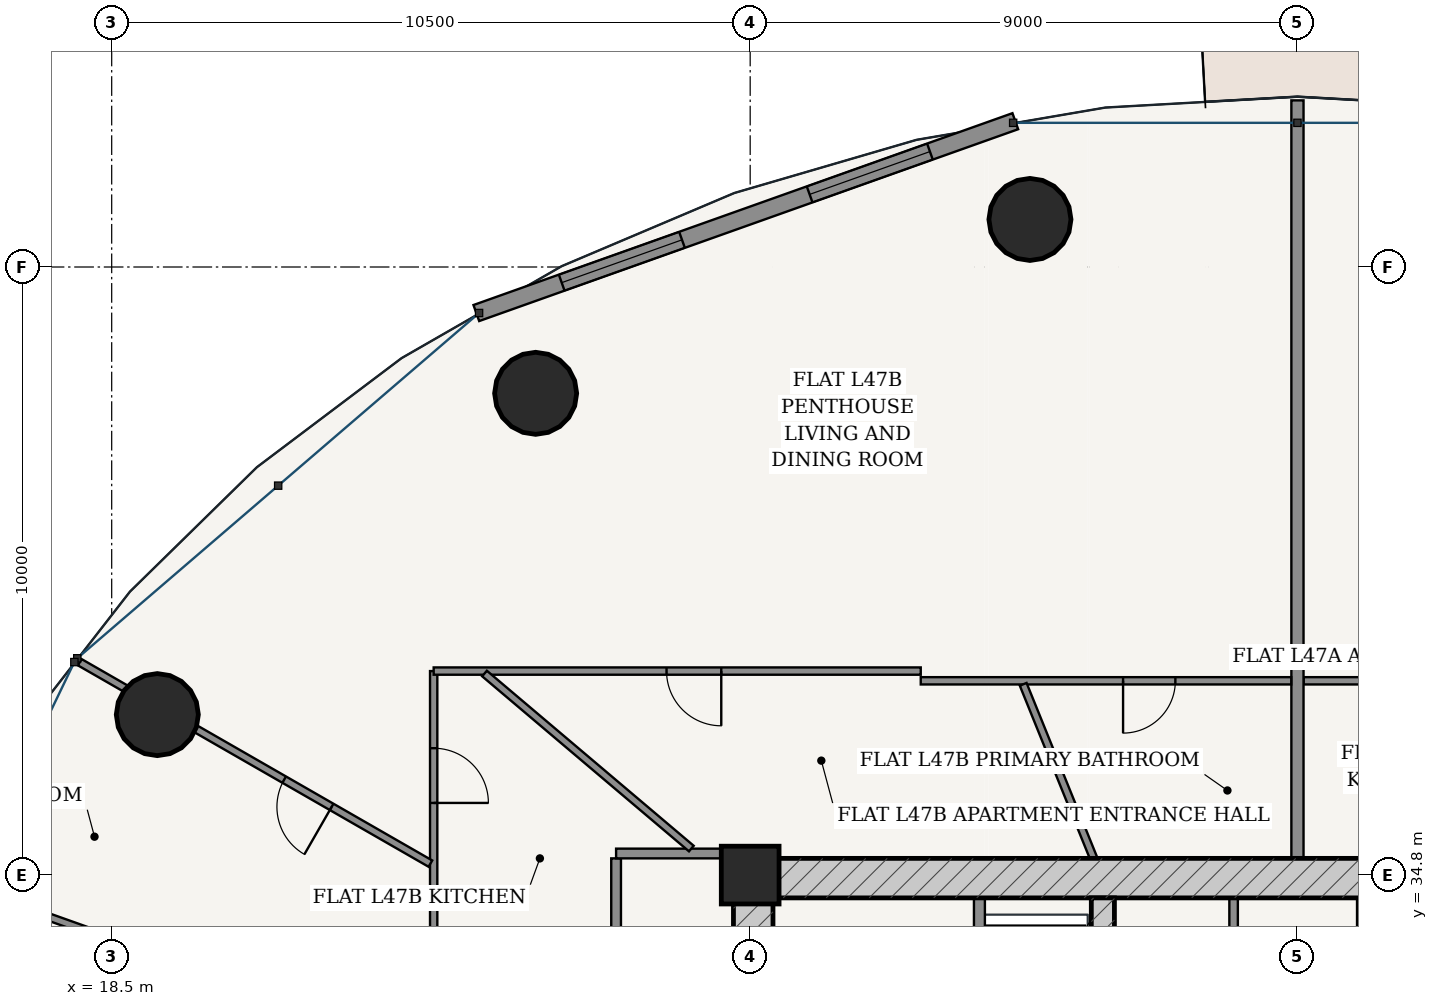
"""IFC4 building model, lengths in metres.
Left out: names, types, materials, properties, quantities, classifications, styles, units other than length and angle.
Written with IfcOpenShell. Run it as: python <this file> out.ifc"""

import sys

from ifc_helpers import new_model, si_unit, direction, frame, frame_2d, origin, origin_2d, place, context, subcontext, project, spatial, rectangle, hollow_circle, extrude, source, transform, mapped, element, fill, save


model = new_model("IFC4")
c1 = context("Model", 3, precision=1e-05, world=origin(), true_north=direction((-0.2419218956, 0.970295726276)))
c2 = subcontext(c1, "Body", "Model", "MODEL_VIEW")
j1 = project(units=[si_unit("LENGTHUNIT", "METRE"), si_unit("PLANEANGLEUNIT", "RADIAN")], contexts=[c1])
p1 = place(None, origin())
s1 = spatial("IfcSite", under=j1, at=p1, CompositionType="ELEMENT")
p2 = place(p1, origin())
s2 = spatial("IfcBuilding", under=s1, at=p2, CompositionType="ELEMENT")
p3 = place(p2, frame((0.0, 0.0, 178.6)))
s3 = spatial("IfcBuildingStorey", under=s2, at=p3, CompositionType="ELEMENT", Elevation=178.6)
p4 = place(p3, frame((29.0, 34.8, 0.0), z_axis=(0.0, 0.0, 1.0), x_axis=(1.0, 0.0, 0.0)))
e1 = element("IfcColumn", 1, at=p4, inside=s3, PredefinedType="COLUMN", context=c2, shape_type="SweptSolid", body=[
    extrude(rectangle(XDim=0.95, YDim=0.95, at=origin_2d()), origin(), (0.0, 0.0, 1.0), 3.6),
])
p5 = place(p3, frame((28.725, 34.75, 0.0), z_axis=(0.0, 0.0, 1.0), x_axis=(1.0, 0.0, 0.0)))
e2 = element("IfcWall", 2, at=p5, inside=s3, PredefinedType="SHEAR", context=c2, shape_type="SweptSolid", body=[
    extrude(rectangle(XDim=18.55, YDim=0.65, at=frame_2d((9.275, 0.0))), origin(), (0.0, 0.0, 1.0), 3.33),
])
p6 = place(p3, frame((29.05, 19.175, 0.0), z_axis=(0.0, 0.0, 1.0), x_axis=(0.0, 1.0, 0.0)))
e3 = element("IfcWall", 3, at=p6, inside=s3, PredefinedType="SHEAR", context=c2, shape_type="SweptSolid", body=[
    extrude(rectangle(XDim=15.25, YDim=0.65, at=frame_2d((7.625, 0.0))), origin(), (0.0, 0.0, 1.0), 3.33),
])
p7 = place(p6, frame((9.875, 0.0, 0.0)))
e4 = element("IfcOpeningElement", 4, at=p7, cuts=e3, PredefinedType="OPENING", context=c2, shape_type="SweptSolid", body=[
    extrude(rectangle(XDim=1.5, YDim=2.2, at=frame_2d((0.75, 1.1))), frame((0.0, 0.335, 0.0), z_axis=(0.0, -1.0, 0.0), x_axis=(1.0, 0.0, 0.0)), (0.0, 0.0, 1.0), 0.67),
])
p8 = place(p3, frame((34.8, 19.175, 0.0), z_axis=(0.0, 0.0, 1.0), x_axis=(0.0, 1.0, 0.0)))
e5 = element("IfcWall", 5, at=p8, inside=s3, PredefinedType="SHEAR", context=c2, shape_type="SweptSolid", body=[
    extrude(rectangle(XDim=15.25, YDim=0.38, at=frame_2d((7.625, 0.0))), origin(), (0.0, 0.0, 1.0), 3.33),
])
p9 = place(p8, frame((7.8, 0.0, 0.0)))
e6 = element("IfcOpeningElement", 6, at=p9, cuts=e5, PredefinedType="OPENING", context=c2, shape_type="SweptSolid", body=[
    extrude(rectangle(XDim=1.05, YDim=2.15, at=frame_2d((0.525, 1.075))), frame((0.0, 0.2, 0.0), z_axis=(0.0, -1.0, 0.0), x_axis=(1.0, 0.0, 0.0)), (0.0, 0.0, 1.0), 0.4),
])
for number, where, z_axis, x_axis in (
    (7, (33.601, 45.582, 0.0), (0.0, 0.0, 1.0), (1.0, 0.0, 0.0)),
    (8, (25.472, 42.723, 0.0), (0.0, 0.0, 1.0), (1.0, 0.0, 0.0)),
    (9, (19.25, 37.439, 0.0), (0.0, 0.0, 1.0), (1.0, 0.0, 0.0)),
):
    element("IfcColumn", number, at=place(p3, frame(where, z_axis=z_axis, x_axis=x_axis)), inside=s3, PredefinedType="COLUMN", context=c2, shape_type="SweptSolid", body=[
        extrude(hollow_circle(Radius=0.675, WallThickness=0.042, at=origin_2d()), origin(), (0.0, 0.0, 1.0), 3.6),
    ])
p10 = place(p3, frame((33.36, 47.198, 0.0), z_axis=(0.0, 0.0, 1.0), x_axis=(-0.942095406405, -0.335344964522, 0.0)))
e10 = element("IfcWall", 10, at=p10, inside=s3, PredefinedType="SOLIDWALL", context=c2, shape_type="SweptSolid", body=[
    extrude(rectangle(XDim=9.408, YDim=0.28, at=frame_2d((4.704, 0.0))), origin(), (0.0, 0.0, 1.0), 3.33),
])
p11 = place(p10, frame((1.49, 0.0, 0.85)))
e11 = element("IfcOpeningElement", 11, at=p11, cuts=e10, PredefinedType="OPENING", context=c2, shape_type="SweptSolid", body=[
    extrude(rectangle(XDim=2.1, YDim=1.95, at=frame_2d((1.05, 0.975))), frame((0.0, 0.15, 0.0), z_axis=(0.0, -1.0, 0.0), x_axis=(1.0, 0.0, 0.0)), (0.0, 0.0, 1.0), 0.3),
])
p12 = place(p10, frame((5.818, 0.0, 0.85)))
e12 = element("IfcOpeningElement", 12, at=p12, cuts=e10, PredefinedType="OPENING", context=c2, shape_type="SweptSolid", body=[
    extrude(rectangle(XDim=2.1, YDim=1.95, at=frame_2d((1.05, 0.975))), frame((0.0, 0.15, 0.0), z_axis=(0.0, -1.0, 0.0), x_axis=(1.0, 0.0, 0.0)), (0.0, 0.0, 1.0), 0.3),
])
p13 = place(p3, frame((32.77, 28.52, 0.0), z_axis=(0.0, 0.0, 1.0), x_axis=(0.0, 1.0, 0.0)))
e13 = element("IfcWall", 13, at=p13, inside=s3, PredefinedType="PARTITIONING", context=c2, shape_type="SweptSolid", body=[
    extrude(rectangle(XDim=5.905, YDim=0.18, at=frame_2d((2.953, 0.0))), origin(), (0.0, 0.0, 1.0), 3.33),
])
p14 = place(p13, frame((3.655, 0.0, 0.0)))
e14 = element("IfcOpeningElement", 14, at=p14, cuts=e13, PredefinedType="OPENING", context=c2, shape_type="SweptSolid", body=[
    extrude(rectangle(XDim=1.15, YDim=2.2, at=frame_2d((0.575, 1.1))), frame((0.0, 0.1, 0.0), z_axis=(0.0, -1.0, 0.0), x_axis=(1.0, 0.0, 0.0)), (0.0, 0.0, 1.0), 0.2),
])
p15 = place(p13, frame((0.73, 0.0, 0.0)))
e15 = element("IfcOpeningElement", 15, at=p15, cuts=e13, PredefinedType="OPENING", context=c2, shape_type="SweptSolid", body=[
    extrude(rectangle(XDim=1.2, YDim=2.25, at=frame_2d((0.6, 1.125))), frame((0.0, 0.1, 0.0), z_axis=(0.0, -1.0, 0.0), x_axis=(1.0, 0.0, 0.0)), (0.0, 0.0, 1.0), 0.2),
])
for number, where, z_axis, x_axis in (
    (16, (36.95, 28.56, 0.0), (0.0, 0.0, 1.0), (0.0, 1.0, 0.0)),
    (17, (39.05, 28.56, 0.0), (0.0, 0.0, 1.0), (0.0, 1.0, 0.0)),
):
    element("IfcWall", number, at=place(p3, frame(where, z_axis=z_axis, x_axis=x_axis)), inside=s3, PredefinedType="PARTITIONING", context=c2, shape_type="SweptSolid", body=[
        extrude(rectangle(XDim=5.865, YDim=0.14, at=frame_2d((2.933, 0.0))), origin(), (0.0, 0.0, 1.0), 3.33),
    ])
p16 = place(p3, frame((26.795, 24.4, 0.0), z_axis=(0.0, 0.0, 1.0), x_axis=(0.0, 1.0, 0.0)))
e18 = element("IfcWall", 18, at=p16, inside=s3, PredefinedType="PARTITIONING", context=c2, shape_type="SweptSolid", body=[
    extrude(rectangle(XDim=10.675, YDim=0.16, at=frame_2d((5.337, 0.0))), origin(), (0.0, 0.0, 1.0), 2.776),
])
p17 = place(p16, frame((8.422, 0.0, 0.0)))
e19 = element("IfcOpeningElement", 19, at=p17, cuts=e18, PredefinedType="OPENING", context=c2, shape_type="SweptSolid", body=[
    extrude(rectangle(XDim=0.98, YDim=2.2, at=frame_2d((0.49, 1.1))), frame((0.0, 0.09, 0.0), z_axis=(0.0, -1.0, 0.0), x_axis=(1.0, 0.0, 0.0)), (0.0, 0.0, 1.0), 0.18),
])
p18 = place(p3, frame((26.795, 35.155, 0.0), z_axis=(0.0, 0.0, 1.0), x_axis=(1.0, 0.0, 0.0)))
e20 = element("IfcWall", 20, at=p18, inside=s3, PredefinedType="PARTITIONING", context=c2, shape_type="SweptSolid", body=[
    extrude(rectangle(XDim=1.93, YDim=0.16, at=frame_2d((0.965, 0.0))), origin(), (0.0, 0.0, 1.0), 2.776),
])
p19 = place(p3, frame((38.102, 37.995, 0.0), z_axis=(0.0, 0.0, 1.0), x_axis=(1.0, 0.0, 0.0)))
e21 = element("IfcWall", 21, at=p19, inside=s3, PredefinedType="PARTITIONING", context=c2, shape_type="SweptSolid", body=[
    extrude(rectangle(XDim=6.093, YDim=0.12, at=frame_2d((3.046, 0.0))), origin(), (0.0, 0.0, 1.0), 2.776),
])
p20 = place(p3, frame((38.0, 35.075, 0.0), z_axis=(0.0, 0.0, 1.0), x_axis=(0.0, 1.0, 0.0)))
e22 = element("IfcWall", 22, at=p20, inside=s3, PredefinedType="PARTITIONING", context=c2, shape_type="SweptSolid", body=[
    extrude(rectangle(XDim=12.465, YDim=0.2, at=frame_2d((6.232, 0.0))), origin(), (0.0, 0.0, 1.0), 2.415),
])
p21 = place(p3, frame((23.795, 26.902, 0.0), z_axis=(0.0, 0.0, 1.0), x_axis=(0.0, 1.0, 0.0)))
e23 = element("IfcWall", 23, at=p21, inside=s3, PredefinedType="PARTITIONING", context=c2, shape_type="SweptSolid", body=[
    extrude(rectangle(XDim=11.253, YDim=0.12, at=frame_2d((5.626, 0.0))), origin(), (0.0, 0.0, 1.0), 2.776),
])
p22 = place(p21, frame((9.085, 0.0, 0.0)))
e24 = element("IfcOpeningElement", 24, at=p22, cuts=e23, PredefinedType="OPENING", context=c2, shape_type="SweptSolid", body=[
    extrude(rectangle(XDim=0.9, YDim=2.15, at=frame_2d((0.45, 1.075))), frame((0.0, 0.07, 0.0), z_axis=(0.0, -1.0, 0.0), x_axis=(1.0, 0.0, 0.0)), (0.0, 0.0, 1.0), 0.14),
])
p23 = place(p3, frame((23.795, 38.155, 0.0), z_axis=(0.0, 0.0, 1.0), x_axis=(1.0, 0.0, 0.0)))
e25 = element("IfcWall", 25, at=p23, inside=s3, PredefinedType="PARTITIONING", context=c2, shape_type="SweptSolid", body=[
    extrude(rectangle(XDim=8.01, YDim=0.12, at=frame_2d((4.005, 0.0))), origin(), (0.0, 0.0, 1.0), 2.776),
])
p24 = place(p23, frame((3.83, 0.0, 0.0)))
e26 = element("IfcOpeningElement", 26, at=p24, cuts=e25, PredefinedType="OPENING", context=c2, shape_type="SweptSolid", body=[
    extrude(rectangle(XDim=0.9, YDim=2.15, at=frame_2d((0.45, 1.075))), frame((0.0, 0.07, 0.0), z_axis=(0.0, -1.0, 0.0), x_axis=(1.0, 0.0, 0.0)), (0.0, 0.0, 1.0), 0.14),
])
p25 = place(p3, frame((31.805, 37.995, 0.0), z_axis=(0.0, 0.0, 1.0), x_axis=(1.0, 0.0, 0.0)))
e27 = element("IfcWall", 27, at=p25, inside=s3, PredefinedType="PARTITIONING", context=c2, shape_type="SweptSolid", body=[
    extrude(rectangle(XDim=6.093, YDim=0.12, at=frame_2d((3.046, 0.0))), origin(), (0.0, 0.0, 1.0), 2.776),
])
p26 = place(p25, frame((3.327, 0.0, 0.0)))
e28 = element("IfcOpeningElement", 28, at=p26, cuts=e27, PredefinedType="OPENING", context=c2, shape_type="SweptSolid", body=[
    extrude(rectangle(XDim=0.86, YDim=2.15, at=frame_2d((0.43, 1.075))), frame((0.0, 0.07, 0.0), z_axis=(0.0, -1.0, 0.0), x_axis=(1.0, 0.0, 0.0)), (0.0, 0.0, 1.0), 0.14),
])
p27 = place(p3, frame((23.741, 34.989, 0.0), z_axis=(0.0, 0.0, 1.0), x_axis=(-0.867167953258, 0.498015803808, 0.0)))
e29 = element("IfcWall", 29, at=p27, inside=s3, PredefinedType="PARTITIONING", context=c2, shape_type="SweptSolid", body=[
    extrude(rectangle(XDim=6.65, YDim=0.12, at=frame_2d((3.325, 0.0))), origin(), (0.0, 0.0, 1.0), 2.776),
])
p28 = place(p27, frame((1.873, 0.0, 0.0)))
e30 = element("IfcOpeningElement", 30, at=p28, cuts=e29, PredefinedType="OPENING", context=c2, shape_type="SweptSolid", body=[
    extrude(rectangle(XDim=0.9, YDim=2.15, at=frame_2d((0.45, 1.075))), frame((0.0, 0.07, 0.0), z_axis=(0.0, -1.0, 0.0), x_axis=(1.0, 0.0, 0.0)), (0.0, 0.0, 1.0), 0.14),
])
p29 = place(p3, frame((23.737, 31.878, 0.0), z_axis=(0.0, 0.0, 1.0), x_axis=(-0.942071057968, 0.335413359512, 0.0)))
e31 = element("IfcWall", 31, at=p29, inside=s3, PredefinedType="PARTITIONING", context=c2, shape_type="SweptSolid", body=[
    extrude(rectangle(XDim=8.53, YDim=0.12, at=frame_2d((4.265, 0.0))), origin(), (0.0, 0.0, 1.0), 2.846),
])
p30 = place(p29, frame((3.815, 0.0, 0.0)))
e32 = element("IfcOpeningElement", 32, at=p30, cuts=e31, PredefinedType="OPENING", context=c2, shape_type="SweptSolid", body=[
    extrude(rectangle(XDim=0.9, YDim=2.15, at=frame_2d((0.45, 1.075))), frame((0.0, 0.07, 0.0), z_axis=(0.0, -1.0, 0.0), x_axis=(1.0, 0.0, 0.0)), (0.0, 0.0, 1.0), 0.14),
])
p31 = place(p3, frame((34.649, 35.075, 0.0), z_axis=(0.0, 0.0, 1.0), x_axis=(-0.375339921816, 0.926887233212, 0.0)))
e33 = element("IfcWall", 33, at=p31, inside=s3, PredefinedType="PARTITIONING", context=c2, shape_type="SweptSolid", body=[
    extrude(rectangle(XDim=3.088, YDim=0.12, at=frame_2d((1.544, 0.0))), origin(), (0.0, 0.0, 1.0), 3.33),
])
p32 = place(p3, frame((28.032, 35.236, 0.0), z_axis=(0.0, 0.0, 1.0), x_axis=(-0.763321857138, 0.646018376221, 0.0)))
e34 = element("IfcWall", 34, at=p32, inside=s3, PredefinedType="PARTITIONING", context=c2, shape_type="SweptSolid", body=[
    extrude(rectangle(XDim=4.456, YDim=0.12, at=frame_2d((2.228, 0.0))), origin(), (0.0, 0.0, 1.0), 3.005),
])
m1 = source(origin(), c2, "Body", "SweptSolid", [
    extrude(rectangle(XDim=2.1, YDim=1.95, at=frame_2d((1.05, 0.975))), frame((0.0, 0.03, 0.0), z_axis=(0.0, -1.0, 0.0), x_axis=(1.0, 0.0, 0.0)), (0.0, 0.0, 1.0), 0.06),
])
p33 = place(p11, origin())
e35 = element("IfcWindow", 35, at=p33, inside=s3, PartitioningType="SINGLE_PANEL", PredefinedType="WINDOW", context=c2, shape_type="MappedRepresentation", body=[
    mapped(m1, transform((0.0, 0.0, 0.0), scale=1.0)),
])
fill(e11, e35)
p34 = place(p12, origin())
e36 = element("IfcWindow", 36, at=p34, inside=s3, PartitioningType="SINGLE_PANEL", PredefinedType="WINDOW", context=c2, shape_type="MappedRepresentation", body=[
    mapped(m1, transform((0.0, 0.0, 0.0), scale=1.0)),
])
fill(e12, e36)
m2 = source(origin(), c2, "Body", "SweptSolid", [
    extrude(rectangle(XDim=0.9, YDim=2.15, at=frame_2d((0.45, 1.075))), frame((0.0, 0.025, 0.0), z_axis=(0.0, -1.0, 0.0), x_axis=(1.0, 0.0, 0.0)), (0.0, 0.0, 1.0), 0.05),
])
p35 = place(p22, frame((0.9, 0.0, 0.0), z_axis=(0.0, 0.0, 1.0), x_axis=(-1.0, 0.0, 0.0)))
e37 = element("IfcDoor", 37, at=p35, inside=s3, OperationType="SINGLE_SWING_RIGHT", PredefinedType="DOOR", context=c2, shape_type="MappedRepresentation", body=[
    mapped(m2, transform((0.0, 0.0, 0.0), scale=1.0)),
])
fill(e24, e37)
p36 = place(p24, frame((0.9, 0.0, 0.0), z_axis=(0.0, 0.0, 1.0), x_axis=(-1.0, 0.0, 0.0)))
e38 = element("IfcDoor", 38, at=p36, inside=s3, OperationType="SINGLE_SWING_LEFT", PredefinedType="DOOR", context=c2, shape_type="MappedRepresentation", body=[
    mapped(m2, transform((0.0, 0.0, 0.0), scale=1.0)),
])
fill(e26, e38)
p37 = place(p28, origin())
e39 = element("IfcDoor", 39, at=p37, inside=s3, OperationType="SINGLE_SWING_LEFT", PredefinedType="DOOR", context=c2, shape_type="MappedRepresentation", body=[
    mapped(m2, transform((0.0, 0.0, 0.0), scale=1.0)),
])
fill(e30, e39)
m3 = source(origin(), c2, "Body", "SweptSolid", [
    extrude(rectangle(XDim=0.86, YDim=2.15, at=frame_2d((0.43, 1.075))), frame((0.0, 0.025, 0.0), z_axis=(0.0, -1.0, 0.0), x_axis=(1.0, 0.0, 0.0)), (0.0, 0.0, 1.0), 0.05),
])
p38 = place(p26, frame((0.86, 0.0, 0.0), z_axis=(0.0, 0.0, 1.0), x_axis=(-1.0, 0.0, 0.0)))
e40 = element("IfcDoor", 40, at=p38, inside=s3, OperationType="SINGLE_SWING_RIGHT", PredefinedType="DOOR", context=c2, shape_type="MappedRepresentation", body=[
    mapped(m3, transform((0.0, 0.0, 0.0), scale=1.0)),
])
fill(e28, e40)
save(model, sys.argv[1])
